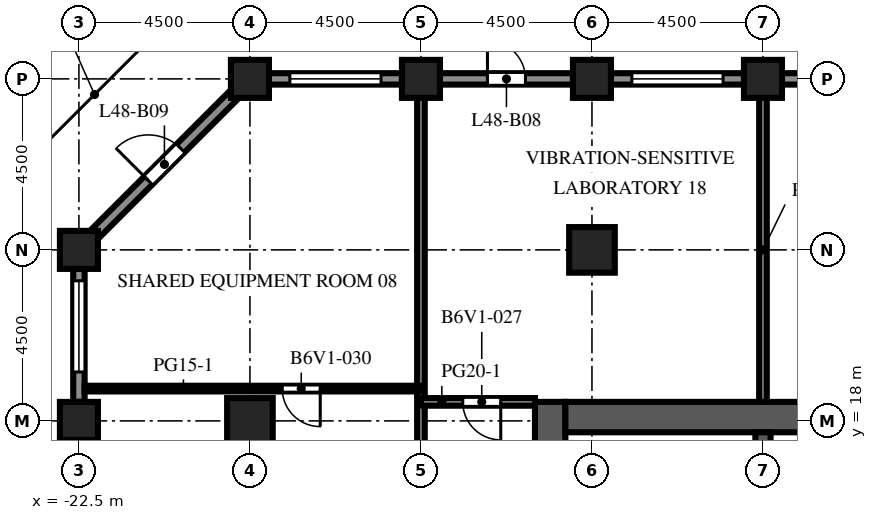
"""IFC4 building model, lengths in metres.
Left out: names, types, materials, properties, quantities, classifications, styles, units other than length and angle.
Written with IfcOpenShell. Run it as: python <this file> out.ifc"""

import sys

from ifc_helpers import new_model, si_unit, direction, frame, frame_2d, origin, origin_2d, place, context, subcontext, project, spatial, rectangle, extrude, element, fill, save


model = new_model("IFC4")
c1 = context("Model", 3, precision=1e-05, world=origin(), true_north=direction((0.0, 1.0)))
c2 = subcontext(c1, "Body", "Model", "MODEL_VIEW")
j1 = project(units=[si_unit("LENGTHUNIT", "METRE"), si_unit("PLANEANGLEUNIT", "RADIAN")], contexts=[c1])
p1 = place(None, origin())
s1 = spatial("IfcSite", under=j1, at=p1, CompositionType="ELEMENT")
p2 = place(p1, origin())
s2 = spatial("IfcBuilding", under=s1, at=p2, CompositionType="ELEMENT")
p3 = place(p2, frame((0.0, 0.0, 212.0)))
s3 = spatial("IfcBuildingStorey", under=s2, at=p3, CompositionType="ELEMENT", Elevation=212.0)
for number, where, z_axis, x_axis in (
    (1, (-22.5, 18.0, 0.0), (0.0, 0.0, 1.0), (1.0, 0.0, 0.0)),
    (2, (-22.5, 22.5, 0.0), (0.0, 0.0, 1.0), (1.0, 0.0, 0.0)),
    (3, (-18.0, 27.0, 0.0), (0.0, 0.0, 1.0), (1.0, 0.0, 0.0)),
    (4, (-13.5, 27.0, 0.0), (0.0, 0.0, 1.0), (1.0, 0.0, 0.0)),
    (5, (-9.0, 27.0, 0.0), (0.0, 0.0, 1.0), (1.0, 0.0, 0.0)),
    (6, (-4.5, 27.0, 0.0), (0.0, 0.0, 1.0), (1.0, 0.0, 0.0)),
):
    element("IfcColumn", number, at=place(p3, frame(where, z_axis=z_axis, x_axis=x_axis)), inside=s3, PredefinedType="COLUMN", context=c2, shape_type="SweptSolid", body=[
        extrude(rectangle(XDim=1.0, YDim=1.0, at=origin_2d()), origin(), (0.0, 0.0, 1.0), 4.1),
    ])
for number, where, z_axis, x_axis in (
    (7, (-18.0, 18.0, 0.0), (0.0, 0.0, 1.0), (1.0, 0.0, 0.0)),
    (8, (-9.0, 22.5, 0.0), (0.0, 0.0, 1.0), (1.0, 0.0, 0.0)),
):
    element("IfcColumn", number, at=place(p3, frame(where, z_axis=z_axis, x_axis=x_axis)), inside=s3, PredefinedType="COLUMN", context=c2, shape_type="SweptSolid", body=[
        extrude(rectangle(XDim=1.2, YDim=1.2, at=origin_2d()), origin(), (0.0, 0.0, 1.0), 4.1),
    ])
p4 = place(p3, frame((-10.1, -9.0, 0.0), z_axis=(0.0, 0.0, 1.0), x_axis=(0.0, 1.0, 0.0)))
e9 = element("IfcWall", 9, at=p4, inside=s3, PredefinedType="SHEAR", context=c2, shape_type="SweptSolid", body=[
    extrude(rectangle(XDim=27.5, YDim=0.8, at=frame_2d((13.75, 0.0))), origin(), (0.0, 0.0, 1.0), 4.1),
])
p5 = place(p4, frame((12.55, 0.0, 0.0)))
e10 = element("IfcOpeningElement", 10, at=p5, cuts=e9, PredefinedType="OPENING", context=c2, shape_type="SweptSolid", body=[
    extrude(rectangle(XDim=2.4, YDim=2.4, at=frame_2d((1.2, 1.2))), frame((0.0, 0.41, 0.0), z_axis=(0.0, -1.0, 0.0), x_axis=(1.0, 0.0, 0.0)), (0.0, 0.0, 1.0), 0.82),
])
p6 = place(p4, frame((6.825, 0.0, 0.0)))
e11 = element("IfcOpeningElement", 11, at=p6, cuts=e9, PredefinedType="OPENING", context=c2, shape_type="SweptSolid", body=[
    extrude(rectangle(XDim=1.2, YDim=2.1, at=frame_2d((0.6, 1.05))), frame((0.0, 0.41, 0.0), z_axis=(0.0, -1.0, 0.0), x_axis=(1.0, 0.0, 0.0)), (0.0, 0.0, 1.0), 0.82),
])
p7 = place(p4, frame((19.475, 0.0, 0.0)))
e12 = element("IfcOpeningElement", 12, at=p7, cuts=e9, PredefinedType="OPENING", context=c2, shape_type="SweptSolid", body=[
    extrude(rectangle(XDim=1.2, YDim=2.1, at=frame_2d((0.6, 1.05))), frame((0.0, 0.41, 0.0), z_axis=(0.0, -1.0, 0.0), x_axis=(1.0, 0.0, 0.0)), (0.0, 0.0, 1.0), 0.82),
])
p8 = place(p3, frame((-9.7, 18.1, 0.0), z_axis=(0.0, 0.0, 1.0), x_axis=(1.0, 0.0, 0.0)))
e13 = element("IfcWall", 13, at=p8, inside=s3, PredefinedType="SHEAR", context=c2, shape_type="SweptSolid", body=[
    extrude(rectangle(XDim=10.4, YDim=0.8, at=frame_2d((5.2, 0.0))), origin(), (0.0, 0.0, 1.0), 4.1),
])
p9 = place(p3, frame((-4.5, 10.2, 0.0), z_axis=(0.0, 0.0, 1.0), x_axis=(0.0, 1.0, 0.0)))
e14 = element("IfcWall", 14, at=p9, inside=s3, PredefinedType="SHEAR", context=c2, shape_type="SweptSolid", body=[
    extrude(rectangle(XDim=7.5, YDim=0.4, at=frame_2d((3.75, 0.0))), origin(), (0.0, 0.0, 1.0), 4.1),
])
p10 = place(p3, frame((-4.0, 27.0, 0.0), z_axis=(0.0, 0.0, 1.0), x_axis=(1.0, 0.0, 0.0)))
e15 = element("IfcWall", 15, at=p10, inside=s3, PredefinedType="SOLIDWALL", context=c2, shape_type="SweptSolid", body=[
    extrude(rectangle(XDim=3.5, YDim=0.3, at=frame_2d((1.75, 0.0))), origin(), (0.0, 0.0, 1.0), 2.85),
])
p11 = place(p10, frame((0.55, 0.0, 0.8)))
e16 = element("IfcOpeningElement", 16, at=p11, cuts=e15, PredefinedType="OPENING", context=c2, shape_type="SweptSolid", body=[
    extrude(rectangle(XDim=2.4, YDim=1.7, at=frame_2d((1.2, 0.85))), frame((0.0, 0.16, 0.0), z_axis=(0.0, -1.0, 0.0), x_axis=(1.0, 0.0, 0.0)), (0.0, 0.0, 1.0), 0.32),
])
p12 = place(p3, frame((-8.5, 27.0, 0.0), z_axis=(0.0, 0.0, 1.0), x_axis=(1.0, 0.0, 0.0)))
e17 = element("IfcWall", 17, at=p12, inside=s3, PredefinedType="SOLIDWALL", context=c2, shape_type="SweptSolid", body=[
    extrude(rectangle(XDim=3.5, YDim=0.3, at=frame_2d((1.75, 0.0))), origin(), (0.0, 0.0, 1.0), 2.85),
])
p13 = place(p12, frame((0.55, 0.0, 0.8)))
e18 = element("IfcOpeningElement", 18, at=p13, cuts=e17, PredefinedType="OPENING", context=c2, shape_type="SweptSolid", body=[
    extrude(rectangle(XDim=2.4, YDim=1.7, at=frame_2d((1.2, 0.85))), frame((0.0, 0.16, 0.0), z_axis=(0.0, -1.0, 0.0), x_axis=(1.0, 0.0, 0.0)), (0.0, 0.0, 1.0), 0.32),
])
p14 = place(p3, frame((-13.0, 27.0, 0.0), z_axis=(0.0, 0.0, 1.0), x_axis=(1.0, 0.0, 0.0)))
e19 = element("IfcWall", 19, at=p14, inside=s3, PredefinedType="SOLIDWALL", context=c2, shape_type="SweptSolid", body=[
    extrude(rectangle(XDim=3.5, YDim=0.3, at=frame_2d((1.75, 0.0))), origin(), (0.0, 0.0, 1.0), 2.85),
])
p15 = place(p14, frame((1.25, 0.0, 0.0)))
e20 = element("IfcOpeningElement", 20, at=p15, cuts=e19, PredefinedType="OPENING", context=c2, shape_type="SweptSolid", body=[
    extrude(rectangle(XDim=1.0, YDim=2.2, at=frame_2d((0.5, 1.1))), frame((0.0, 0.16, 0.0), z_axis=(0.0, -1.0, 0.0), x_axis=(1.0, 0.0, 0.0)), (0.0, 0.0, 1.0), 0.32),
])
p16 = place(p3, frame((-17.5, 27.0, 0.0), z_axis=(0.0, 0.0, 1.0), x_axis=(1.0, 0.0, 0.0)))
e21 = element("IfcWall", 21, at=p16, inside=s3, PredefinedType="SOLIDWALL", context=c2, shape_type="SweptSolid", body=[
    extrude(rectangle(XDim=3.5, YDim=0.3, at=frame_2d((1.75, 0.0))), origin(), (0.0, 0.0, 1.0), 2.85),
])
p17 = place(p16, frame((0.55, 0.0, 0.8)))
e22 = element("IfcOpeningElement", 22, at=p17, cuts=e21, PredefinedType="OPENING", context=c2, shape_type="SweptSolid", body=[
    extrude(rectangle(XDim=2.4, YDim=1.7, at=frame_2d((1.2, 0.85))), frame((0.0, 0.16, 0.0), z_axis=(0.0, -1.0, 0.0), x_axis=(1.0, 0.0, 0.0)), (0.0, 0.0, 1.0), 0.32),
])
p18 = place(p3, frame((-22.106, 22.894, 0.0), z_axis=(0.0, 0.0, 1.0), x_axis=(0.707106781187, 0.707106781187, 0.0)))
e23 = element("IfcWall", 23, at=p18, inside=s3, PredefinedType="SOLIDWALL", context=c2, shape_type="SweptSolid", body=[
    extrude(rectangle(XDim=5.25, YDim=0.3, at=frame_2d((2.625, 0.0))), origin(), (0.0, 0.0, 1.0), 2.85),
])
p19 = place(p18, frame((2.025, 0.0, 0.0)))
e24 = element("IfcOpeningElement", 24, at=p19, cuts=e23, PredefinedType="OPENING", context=c2, shape_type="SweptSolid", body=[
    extrude(rectangle(XDim=1.2, YDim=2.2, at=frame_2d((0.6, 1.1))), frame((0.0, 0.16, 0.0), z_axis=(0.0, -1.0, 0.0), x_axis=(1.0, 0.0, 0.0)), (0.0, 0.0, 1.0), 0.32),
])
p20 = place(p3, frame((-22.5, 18.5, 0.0), z_axis=(0.0, 0.0, 1.0), x_axis=(0.0, 1.0, 0.0)))
e25 = element("IfcWall", 25, at=p20, inside=s3, PredefinedType="SOLIDWALL", context=c2, shape_type="SweptSolid", body=[
    extrude(rectangle(XDim=3.5, YDim=0.3, at=frame_2d((1.75, 0.0))), origin(), (0.0, 0.0, 1.0), 2.85),
])
p21 = place(p20, frame((0.788, 0.0, 0.8)))
e26 = element("IfcOpeningElement", 26, at=p21, cuts=e25, PredefinedType="OPENING", context=c2, shape_type="SweptSolid", body=[
    extrude(rectangle(XDim=2.4, YDim=1.7, at=frame_2d((1.2, 0.85))), frame((0.0, 0.16, 0.0), z_axis=(0.0, -1.0, 0.0), x_axis=(1.0, 0.0, 0.0)), (0.0, 0.0, 1.0), 0.32),
])
p22 = place(p3, frame((-13.5, 6.25, 0.0), z_axis=(0.0, 0.0, 1.0), x_axis=(0.0, 1.0, 0.0)))
e27 = element("IfcWall", 27, at=p22, inside=s3, PredefinedType="PARTITIONING", context=c2, shape_type="SweptSolid", body=[
    extrude(rectangle(XDim=20.25, YDim=0.2, at=frame_2d((10.125, 0.0))), origin(), (0.0, 0.0, 1.0), 3.65),
])
p23 = place(p3, frame((-4.5, 18.5, 0.0), z_axis=(0.0, 0.0, 1.0), x_axis=(0.0, 1.0, 0.0)))
e28 = element("IfcWall", 28, at=p23, inside=s3, PredefinedType="PARTITIONING", context=c2, shape_type="SweptSolid", body=[
    extrude(rectangle(XDim=8.0, YDim=0.2, at=frame_2d((4.0, 0.0))), origin(), (0.0, 0.0, 1.0), 3.65),
])
p24 = place(p3, frame((-13.5, 18.5, 0.0), z_axis=(0.0, 0.0, 1.0), x_axis=(1.0, 0.0, 0.0)))
e29 = element("IfcWall", 29, at=p24, inside=s3, PredefinedType="PARTITIONING", context=c2, shape_type="SweptSolid", body=[
    extrude(rectangle(XDim=3.0, YDim=0.2, at=frame_2d((1.5, 0.0))), origin(), (0.0, 0.0, 1.0), 3.65),
])
p25 = place(p24, frame((1.1, 0.0, 0.0)))
e30 = element("IfcOpeningElement", 30, at=p25, cuts=e29, PredefinedType="OPENING", context=c2, shape_type="SweptSolid", body=[
    extrude(rectangle(XDim=1.0, YDim=2.1, at=frame_2d((0.5, 1.05))), frame((0.0, 0.11, 0.0), z_axis=(0.0, -1.0, 0.0), x_axis=(1.0, 0.0, 0.0)), (0.0, 0.0, 1.0), 0.22),
])
p26 = place(p3, frame((-22.35, 18.85, 0.0), z_axis=(0.0, 0.0, 1.0), x_axis=(1.0, 0.0, 0.0)))
e31 = element("IfcWall", 31, at=p26, inside=s3, PredefinedType="PARTITIONING", context=c2, shape_type="SweptSolid", body=[
    extrude(rectangle(XDim=8.85, YDim=0.15, at=frame_2d((4.425, 0.0))), origin(), (0.0, 0.0, 1.0), 3.65),
])
p27 = place(p26, frame((5.2, 0.0, 0.0)))
e32 = element("IfcOpeningElement", 32, at=p27, cuts=e31, PredefinedType="OPENING", context=c2, shape_type="SweptSolid", body=[
    extrude(rectangle(XDim=1.0, YDim=2.1, at=frame_2d((0.5, 1.05))), frame((0.0, 0.085, 0.0), z_axis=(0.0, -1.0, 0.0), x_axis=(1.0, 0.0, 0.0)), (0.0, 0.0, 1.0), 0.17),
])
p28 = place(p13, origin())
e33 = element("IfcWindow", 33, at=p28, inside=s3, PartitioningType="SINGLE_PANEL", PredefinedType="WINDOW", context=c2, shape_type="SweptSolid", body=[
    extrude(rectangle(XDim=2.4, YDim=1.7, at=frame_2d((1.2, 0.85))), frame((0.0, 0.03, 0.0), z_axis=(0.0, -1.0, 0.0), x_axis=(1.0, 0.0, 0.0)), (0.0, 0.0, 1.0), 0.06),
])
fill(e18, e33)
p29 = place(p15, origin())
e34 = element("IfcDoor", 34, at=p29, inside=s3, OperationType="SINGLE_SWING_LEFT", PredefinedType="DOOR", context=c2, shape_type="SweptSolid", body=[
    extrude(rectangle(XDim=1.0, YDim=2.2, at=frame_2d((0.5, 1.1))), frame((0.0, 0.025, 0.0), z_axis=(0.0, -1.0, 0.0), x_axis=(1.0, 0.0, 0.0)), (0.0, 0.0, 1.0), 0.05),
])
fill(e20, e34)
p30 = place(p17, origin())
e35 = element("IfcWindow", 35, at=p30, inside=s3, PartitioningType="SINGLE_PANEL", PredefinedType="WINDOW", context=c2, shape_type="SweptSolid", body=[
    extrude(rectangle(XDim=2.4, YDim=1.7, at=frame_2d((1.2, 0.85))), frame((0.0, 0.03, 0.0), z_axis=(0.0, -1.0, 0.0), x_axis=(1.0, 0.0, 0.0)), (0.0, 0.0, 1.0), 0.06),
])
fill(e22, e35)
p31 = place(p19, origin())
e36 = element("IfcDoor", 36, at=p31, inside=s3, OperationType="SINGLE_SWING_LEFT", PredefinedType="DOOR", context=c2, shape_type="SweptSolid", body=[
    extrude(rectangle(XDim=1.2, YDim=2.2, at=frame_2d((0.6, 1.1))), frame((0.0, 0.025, 0.0), z_axis=(0.0, -1.0, 0.0), x_axis=(1.0, 0.0, 0.0)), (0.0, 0.0, 1.0), 0.05),
])
fill(e24, e36)
p32 = place(p21, origin())
e37 = element("IfcWindow", 37, at=p32, inside=s3, PartitioningType="SINGLE_PANEL", PredefinedType="WINDOW", context=c2, shape_type="SweptSolid", body=[
    extrude(rectangle(XDim=2.4, YDim=1.7, at=frame_2d((1.2, 0.85))), frame((0.0, 0.03, 0.0), z_axis=(0.0, -1.0, 0.0), x_axis=(1.0, 0.0, 0.0)), (0.0, 0.0, 1.0), 0.06),
])
fill(e26, e37)
p33 = place(p25, origin())
e38 = element("IfcDoor", 38, at=p33, inside=s3, OperationType="SINGLE_SWING_RIGHT", PredefinedType="DOOR", context=c2, shape_type="SweptSolid", body=[
    extrude(rectangle(XDim=1.0, YDim=2.1, at=frame_2d((0.5, 1.05))), frame((0.0, 0.025, 0.0), z_axis=(0.0, -1.0, 0.0), x_axis=(1.0, 0.0, 0.0)), (0.0, 0.0, 1.0), 0.05),
])
fill(e30, e38)
p34 = place(p27, origin())
e39 = element("IfcDoor", 39, at=p34, inside=s3, OperationType="SINGLE_SWING_RIGHT", PredefinedType="DOOR", context=c2, shape_type="SweptSolid", body=[
    extrude(rectangle(XDim=1.0, YDim=2.1, at=frame_2d((0.5, 1.05))), frame((0.0, 0.025, 0.0), z_axis=(0.0, -1.0, 0.0), x_axis=(1.0, 0.0, 0.0)), (0.0, 0.0, 1.0), 0.05),
])
fill(e32, e39)
save(model, sys.argv[1])
